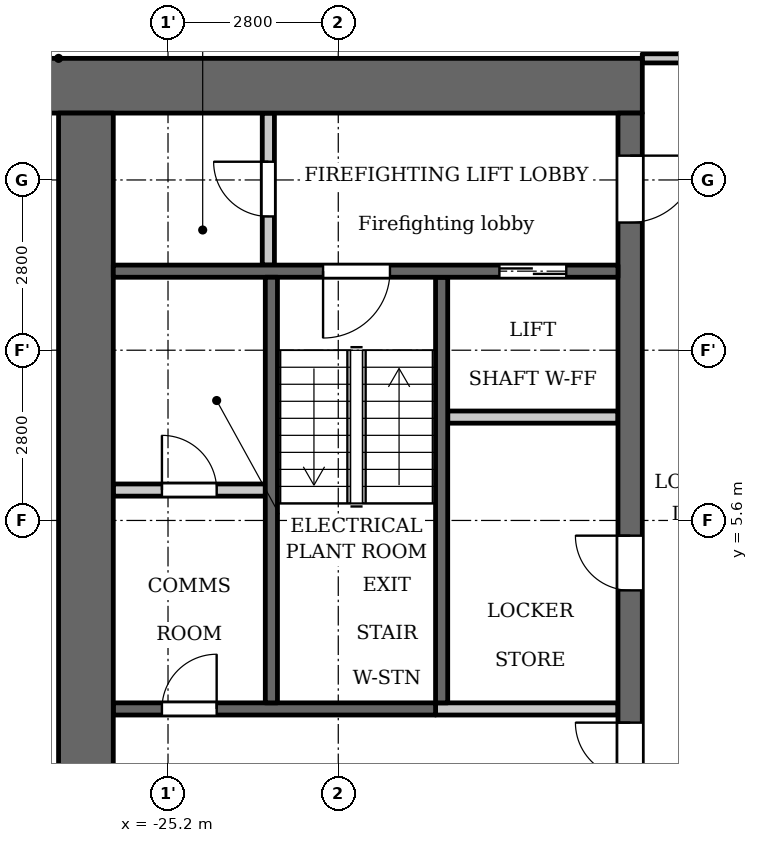
"""IFC4 building model, lengths in metres.
Left out: names, types, materials, properties, quantities, classifications, styles, units other than length and angle.
Written with IfcOpenShell. Run it as: python <this file> out.ifc"""

import sys

from ifc_helpers import new_model, si_unit, direction, frame, frame_2d, origin, place, context, subcontext, project, spatial, rectangle, extrude, element, fill, save


model = new_model("IFC4")
c1 = context("Model", 3, precision=1e-05, world=origin(), true_north=direction((0.0, 1.0)))
c2 = subcontext(c1, "Body", "Model", "MODEL_VIEW")
j1 = project(units=[si_unit("LENGTHUNIT", "METRE"), si_unit("PLANEANGLEUNIT", "RADIAN")], contexts=[c1])
p1 = place(None, origin())
s1 = spatial("IfcSite", under=j1, at=p1, CompositionType="ELEMENT")
p2 = place(p1, origin())
s2 = spatial("IfcBuilding", under=s1, at=p2, CompositionType="ELEMENT")
p3 = place(p2, frame((0.0, 0.0, 100.8)))
s3 = spatial("IfcBuildingStorey", under=s2, at=p3, CompositionType="ELEMENT", Elevation=100.8)
p4 = place(p3, frame((-20.7, 2.6, 0.0), z_axis=(0.0, 0.0, 1.0), x_axis=(0.0, 1.0, 0.0)))
e1 = element("IfcWall", 1, at=p4, inside=s3, PredefinedType="SHEAR", context=c2, shape_type="SweptSolid", body=[
    extrude(rectangle(XDim=7.0, YDim=0.2, at=frame_2d((3.5, 0.0))), origin(), (0.0, 0.0, 1.0), 3.2),
])
p5 = place(p3, frame((-20.8, 2.5, 0.0), z_axis=(0.0, 0.0, 1.0), x_axis=(-1.0, 0.0, 0.0)))
e2 = element("IfcWall", 2, at=p5, inside=s3, PredefinedType="SHEAR", context=c2, shape_type="SweptSolid", body=[
    extrude(rectangle(XDim=5.3, YDim=0.2, at=frame_2d((2.65, 0.0))), origin(), (0.0, 0.0, 1.0), 3.2),
])
p6 = place(p5, frame((3.6, 0.0, 0.0)))
e3 = element("IfcOpeningElement", 3, at=p6, cuts=e2, PredefinedType="OPENING", context=c2, shape_type="SweptSolid", body=[
    extrude(rectangle(XDim=0.9, YDim=2.1, at=frame_2d((0.45, 1.05))), frame((0.0, 0.11, 0.0), z_axis=(0.0, -1.0, 0.0), x_axis=(1.0, 0.0, 0.0)), (0.0, 0.0, 1.0), 0.22),
])
p7 = place(p3, frame((-17.4, 12.75, 0.0), z_axis=(0.0, 0.0, 1.0), x_axis=(-1.0, 0.0, 0.0)))
e4 = element("IfcWall", 4, at=p7, inside=s3, PredefinedType="SHEAR", context=c2, shape_type="SweptSolid", body=[
    extrude(rectangle(XDim=10.4, YDim=0.9, at=frame_2d((5.2, 0.0))), origin(), (0.0, 0.0, 1.0), 3.2),
])
p8 = place(p3, frame((-17.6, -12.3, 0.0), z_axis=(0.0, 0.0, 1.0), x_axis=(0.0, 1.0, 0.0)))
e5 = element("IfcWall", 5, at=p8, inside=s3, PredefinedType="SHEAR", context=c2, shape_type="SweptSolid", body=[
    extrude(rectangle(XDim=24.6, YDim=0.4, at=frame_2d((12.3, 0.0))), origin(), (0.0, 0.0, 1.0), 3.2),
])
p9 = place(p8, frame((6.0, 0.0, 0.0)))
e6 = element("IfcOpeningElement", 6, at=p9, cuts=e5, PredefinedType="OPENING", context=c2, shape_type="SweptSolid", body=[
    extrude(rectangle(XDim=1.1, YDim=2.1, at=frame_2d((0.55, 1.05))), frame((0.0, 0.21, 0.0), z_axis=(0.0, -1.0, 0.0), x_axis=(1.0, 0.0, 0.0)), (0.0, 0.0, 1.0), 0.42),
])
p10 = place(p8, frame((8.4, 0.0, 0.0)))
e7 = element("IfcOpeningElement", 7, at=p10, cuts=e5, PredefinedType="OPENING", context=c2, shape_type="SweptSolid", body=[
    extrude(rectangle(XDim=1.1, YDim=2.1, at=frame_2d((0.55, 1.05))), frame((0.0, 0.21, 0.0), z_axis=(0.0, -1.0, 0.0), x_axis=(1.0, 0.0, 0.0)), (0.0, 0.0, 1.0), 0.42),
])
p11 = place(p8, frame((10.8, 0.0, 0.0)))
e8 = element("IfcOpeningElement", 8, at=p11, cuts=e5, PredefinedType="OPENING", context=c2, shape_type="SweptSolid", body=[
    extrude(rectangle(XDim=1.1, YDim=2.1, at=frame_2d((0.55, 1.05))), frame((0.0, 0.21, 0.0), z_axis=(0.0, -1.0, 0.0), x_axis=(1.0, 0.0, 0.0)), (0.0, 0.0, 1.0), 0.42),
])
p12 = place(p8, frame((16.75, 0.0, 0.0)))
e9 = element("IfcOpeningElement", 9, at=p12, cuts=e5, PredefinedType="OPENING", context=c2, shape_type="SweptSolid", body=[
    extrude(rectangle(XDim=0.9, YDim=2.1, at=frame_2d((0.45, 1.05))), frame((0.0, 0.21, 0.0), z_axis=(0.0, -1.0, 0.0), x_axis=(1.0, 0.0, 0.0)), (0.0, 0.0, 1.0), 0.42),
])
p13 = place(p8, frame((22.8, 0.0, 0.0)))
e10 = element("IfcOpeningElement", 10, at=p13, cuts=e5, PredefinedType="OPENING", context=c2, shape_type="SweptSolid", body=[
    extrude(rectangle(XDim=1.1, YDim=2.1, at=frame_2d((0.55, 1.05))), frame((0.0, 0.21, 0.0), z_axis=(0.0, -1.0, 0.0), x_axis=(1.0, 0.0, 0.0)), (0.0, 0.0, 1.0), 0.42),
])
p14 = place(p8, frame((0.7, 0.0, 0.0)))
e11 = element("IfcOpeningElement", 11, at=p14, cuts=e5, PredefinedType="OPENING", context=c2, shape_type="SweptSolid", body=[
    extrude(rectangle(XDim=1.1, YDim=2.1, at=frame_2d((0.55, 1.05))), frame((0.0, 0.21, 0.0), z_axis=(0.0, -1.0, 0.0), x_axis=(1.0, 0.0, 0.0)), (0.0, 0.0, 1.0), 0.42),
])
p15 = place(p8, frame((12.775, 0.0, 0.0)))
e12 = element("IfcOpeningElement", 12, at=p15, cuts=e5, PredefinedType="OPENING", context=c2, shape_type="SweptSolid", body=[
    extrude(rectangle(XDim=1.8, YDim=2.1, at=frame_2d((0.9, 1.05))), frame((0.0, 0.21, 0.0), z_axis=(0.0, -1.0, 0.0), x_axis=(1.0, 0.0, 0.0)), (0.0, 0.0, 1.0), 0.42),
])
p16 = place(p3, frame((-26.55, -12.3, 0.0), z_axis=(0.0, 0.0, 1.0), x_axis=(0.0, 1.0, 0.0)))
e13 = element("IfcWall", 13, at=p16, inside=s3, PredefinedType="SHEAR", context=c2, shape_type="SweptSolid", body=[
    extrude(rectangle(XDim=24.6, YDim=0.9, at=frame_2d((12.3, 0.0))), origin(), (0.0, 0.0, 1.0), 3.2),
])
p17 = place(p3, frame((-23.55, 9.8, 0.0), z_axis=(0.0, 0.0, 1.0), x_axis=(0.0, 1.0, 0.0)))
e14 = element("IfcWall", 14, at=p17, inside=s3, PredefinedType="PARTITIONING", context=c2, shape_type="SweptSolid", body=[
    extrude(rectangle(XDim=2.5, YDim=0.2, at=frame_2d((1.25, 0.0))), origin(), (0.0, 0.0, 1.0), 3.2),
])
p18 = place(p17, frame((0.8, 0.0, 0.0)))
e15 = element("IfcOpeningElement", 15, at=p18, cuts=e14, PredefinedType="OPENING", context=c2, shape_type="SweptSolid", body=[
    extrude(rectangle(XDim=0.9, YDim=2.1, at=frame_2d((0.45, 1.05))), frame((0.0, 0.11, 0.0), z_axis=(0.0, -1.0, 0.0), x_axis=(1.0, 0.0, 0.0)), (0.0, 0.0, 1.0), 0.22),
])
p19 = place(p3, frame((-23.6, 6.1, 0.0), z_axis=(0.0, 0.0, 1.0), x_axis=(-1.0, 0.0, 0.0)))
e16 = element("IfcWall", 16, at=p19, inside=s3, PredefinedType="PARTITIONING", context=c2, shape_type="SweptSolid", body=[
    extrude(rectangle(XDim=2.5, YDim=0.2, at=frame_2d((1.25, 0.0))), origin(), (0.0, 0.0, 1.0), 3.2),
])
p20 = place(p19, frame((0.8, 0.0, 0.0)))
e17 = element("IfcOpeningElement", 17, at=p20, cuts=e16, PredefinedType="OPENING", context=c2, shape_type="SweptSolid", body=[
    extrude(rectangle(XDim=0.9, YDim=2.1, at=frame_2d((0.45, 1.05))), frame((0.0, 0.11, 0.0), z_axis=(0.0, -1.0, 0.0), x_axis=(1.0, 0.0, 0.0)), (0.0, 0.0, 1.0), 0.22),
])
p21 = place(p3, frame((-17.8, 2.5, 0.0), z_axis=(0.0, 0.0, 1.0), x_axis=(-1.0, 0.0, 0.0)))
e18 = element("IfcWall", 18, at=p21, inside=s3, PredefinedType="PARTITIONING", context=c2, shape_type="SweptSolid", body=[
    extrude(rectangle(XDim=3.0, YDim=0.2, at=frame_2d((1.5, 0.0))), origin(), (0.0, 0.0, 1.0), 3.2),
])
p22 = place(p3, frame((-17.8, 7.3, 0.0), z_axis=(0.0, 0.0, 1.0), x_axis=(-1.0, 0.0, 0.0)))
e19 = element("IfcWall", 19, at=p22, inside=s3, PredefinedType="PARTITIONING", context=c2, shape_type="SweptSolid", body=[
    extrude(rectangle(XDim=2.8, YDim=0.2, at=frame_2d((1.4, 0.0))), origin(), (0.0, 0.0, 1.0), 3.2),
])
p23 = place(p3, frame((-17.8, 9.7, 0.0), z_axis=(0.0, 0.0, 1.0), x_axis=(-1.0, 0.0, 0.0)))
e20 = element("IfcWall", 20, at=p23, inside=s3, PredefinedType="SHEAR", context=c2, shape_type="SweptSolid", body=[
    extrude(rectangle(XDim=8.3, YDim=0.2, at=frame_2d((4.15, 0.0))), origin(), (0.0, 0.0, 1.0), 3.2),
])
p24 = place(p23, frame((0.85, 0.0, 0.0)))
e21 = element("IfcOpeningElement", 21, at=p24, cuts=e20, PredefinedType="OPENING", context=c2, shape_type="SweptSolid", body=[
    extrude(rectangle(XDim=1.1, YDim=2.1, at=frame_2d((0.55, 1.05))), frame((0.0, 0.11, 0.0), z_axis=(0.0, -1.0, 0.0), x_axis=(1.0, 0.0, 0.0)), (0.0, 0.0, 1.0), 0.22),
])
p25 = place(p23, frame((3.75, 0.0, 0.0)))
e22 = element("IfcOpeningElement", 22, at=p25, cuts=e20, PredefinedType="OPENING", context=c2, shape_type="SweptSolid", body=[
    extrude(rectangle(XDim=1.1, YDim=2.1, at=frame_2d((0.55, 1.05))), frame((0.0, 0.11, 0.0), z_axis=(0.0, -1.0, 0.0), x_axis=(1.0, 0.0, 0.0)), (0.0, 0.0, 1.0), 0.22),
])
p26 = place(p3, frame((-23.5, 2.6, 0.0), z_axis=(0.0, 0.0, 1.0), x_axis=(0.0, 1.0, 0.0)))
e23 = element("IfcWall", 23, at=p26, inside=s3, PredefinedType="SHEAR", context=c2, shape_type="SweptSolid", body=[
    extrude(rectangle(XDim=7.0, YDim=0.2, at=frame_2d((3.5, 0.0))), origin(), (0.0, 0.0, 1.0), 3.2),
])
p27 = place(p3, frame((-17.4, 13.2, 0.0), z_axis=(0.0, 0.0, 1.0), x_axis=(1.0, 0.0, 0.0)))
e24 = element("IfcWall", 24, at=p27, inside=s3, PredefinedType="PARTITIONING", context=c2, shape_type="SweptSolid", body=[
    extrude(rectangle(XDim=34.8, YDim=0.15, at=frame_2d((17.4, 0.0))), origin(), (0.0, 0.0, 1.0), 3.2),
])
p28 = place(p27, frame((0.75, 0.0, 0.0)))
e25 = element("IfcOpeningElement", 25, at=p28, cuts=e24, PredefinedType="OPENING", context=c2, shape_type="SweptSolid", body=[
    extrude(rectangle(XDim=1.0, YDim=2.1, at=frame_2d((0.5, 1.05))), frame((0.0, 0.085, 0.0), z_axis=(0.0, -1.0, 0.0), x_axis=(1.0, 0.0, 0.0)), (0.0, 0.0, 1.0), 0.17),
])
p29 = place(p27, frame((33.15, 0.0, 0.0)))
e26 = element("IfcOpeningElement", 26, at=p29, cuts=e24, PredefinedType="OPENING", context=c2, shape_type="SweptSolid", body=[
    extrude(rectangle(XDim=1.0, YDim=2.1, at=frame_2d((0.5, 1.05))), frame((0.0, 0.085, 0.0), z_axis=(0.0, -1.0, 0.0), x_axis=(1.0, 0.0, 0.0)), (0.0, 0.0, 1.0), 0.17),
])
p30 = place(p27, frame((6.85, 0.0, 0.0)))
e27 = element("IfcOpeningElement", 27, at=p30, cuts=e24, PredefinedType="OPENING", context=c2, shape_type="SweptSolid", body=[
    extrude(rectangle(XDim=1.0, YDim=2.1, at=frame_2d((0.5, 1.05))), frame((0.0, 0.085, 0.0), z_axis=(0.0, -1.0, 0.0), x_axis=(1.0, 0.0, 0.0)), (0.0, 0.0, 1.0), 0.17),
])
p31 = place(p27, frame((15.45, 0.0, 0.0)))
e28 = element("IfcOpeningElement", 28, at=p31, cuts=e24, PredefinedType="OPENING", context=c2, shape_type="SweptSolid", body=[
    extrude(rectangle(XDim=1.0, YDim=2.1, at=frame_2d((0.5, 1.05))), frame((0.0, 0.085, 0.0), z_axis=(0.0, -1.0, 0.0), x_axis=(1.0, 0.0, 0.0)), (0.0, 0.0, 1.0), 0.17),
])
p32 = place(p27, frame((21.4, 0.0, 0.0)))
e29 = element("IfcOpeningElement", 29, at=p32, cuts=e24, PredefinedType="OPENING", context=c2, shape_type="SweptSolid", body=[
    extrude(rectangle(XDim=1.0, YDim=2.1, at=frame_2d((0.5, 1.05))), frame((0.0, 0.085, 0.0), z_axis=(0.0, -1.0, 0.0), x_axis=(1.0, 0.0, 0.0)), (0.0, 0.0, 1.0), 0.17),
])
p33 = place(p27, frame((23.65, 0.0, 0.0)))
e30 = element("IfcOpeningElement", 30, at=p33, cuts=e24, PredefinedType="OPENING", context=c2, shape_type="SweptSolid", body=[
    extrude(rectangle(XDim=1.0, YDim=2.1, at=frame_2d((0.5, 1.05))), frame((0.0, 0.085, 0.0), z_axis=(0.0, -1.0, 0.0), x_axis=(1.0, 0.0, 0.0)), (0.0, 0.0, 1.0), 0.17),
])
p34 = place(p12, origin())
e31 = element("IfcDoor", 31, at=p34, inside=s3, OperationType="SINGLE_SWING_LEFT", PredefinedType="DOOR", context=c2, shape_type="SweptSolid", body=[
    extrude(rectangle(XDim=0.9, YDim=2.1, at=frame_2d((0.45, 1.05))), frame((0.0, 0.025, 0.0), z_axis=(0.0, -1.0, 0.0), x_axis=(1.0, 0.0, 0.0)), (0.0, 0.0, 1.0), 0.05),
])
fill(e9, e31)
p35 = place(p24, origin())
e32 = element("IfcDoor", 32, at=p35, inside=s3, OperationType="DOUBLE_DOOR_SLIDING", PredefinedType="DOOR", context=c2, shape_type="SweptSolid", body=[
    extrude(rectangle(XDim=1.1, YDim=2.1, at=frame_2d((0.55, 1.05))), frame((0.0, 0.025, 0.0), z_axis=(0.0, -1.0, 0.0), x_axis=(1.0, 0.0, 0.0)), (0.0, 0.0, 1.0), 0.05),
])
fill(e21, e32)
p36 = place(p13, origin())
e33 = element("IfcDoor", 33, at=p36, inside=s3, OperationType="SINGLE_SWING_RIGHT", PredefinedType="DOOR", context=c2, shape_type="SweptSolid", body=[
    extrude(rectangle(XDim=1.1, YDim=2.1, at=frame_2d((0.55, 1.05))), frame((0.0, 0.025, 0.0), z_axis=(0.0, -1.0, 0.0), x_axis=(1.0, 0.0, 0.0)), (0.0, 0.0, 1.0), 0.05),
])
fill(e10, e33)
p37 = place(p18, origin())
e34 = element("IfcDoor", 34, at=p37, inside=s3, OperationType="SINGLE_SWING_LEFT", PredefinedType="DOOR", context=c2, shape_type="SweptSolid", body=[
    extrude(rectangle(XDim=0.9, YDim=2.1, at=frame_2d((0.45, 1.05))), frame((0.0, 0.025, 0.0), z_axis=(0.0, -1.0, 0.0), x_axis=(1.0, 0.0, 0.0)), (0.0, 0.0, 1.0), 0.05),
])
fill(e15, e34)
p38 = place(p25, origin())
e35 = element("IfcDoor", 35, at=p38, inside=s3, OperationType="SINGLE_SWING_LEFT", PredefinedType="DOOR", context=c2, shape_type="SweptSolid", body=[
    extrude(rectangle(XDim=1.1, YDim=2.1, at=frame_2d((0.55, 1.05))), frame((0.0, 0.025, 0.0), z_axis=(0.0, -1.0, 0.0), x_axis=(1.0, 0.0, 0.0)), (0.0, 0.0, 1.0), 0.05),
])
fill(e22, e35)
p39 = place(p15, origin())
e36 = element("IfcDoor", 36, at=p39, inside=s3, OperationType="DOUBLE_DOOR_SINGLE_SWING", PredefinedType="DOOR", context=c2, shape_type="SweptSolid", body=[
    extrude(rectangle(XDim=1.8, YDim=2.1, at=frame_2d((0.9, 1.05))), frame((0.0, 0.025, 0.0), z_axis=(0.0, -1.0, 0.0), x_axis=(1.0, 0.0, 0.0)), (0.0, 0.0, 1.0), 0.05),
])
fill(e12, e36)
p40 = place(p20, origin())
e37 = element("IfcDoor", 37, at=p40, inside=s3, OperationType="SINGLE_SWING_RIGHT", PredefinedType="DOOR", context=c2, shape_type="SweptSolid", body=[
    extrude(rectangle(XDim=0.9, YDim=2.1, at=frame_2d((0.45, 1.05))), frame((0.0, 0.025, 0.0), z_axis=(0.0, -1.0, 0.0), x_axis=(1.0, 0.0, 0.0)), (0.0, 0.0, 1.0), 0.05),
])
fill(e17, e37)
p41 = place(p6, origin())
e38 = element("IfcDoor", 38, at=p41, inside=s3, OperationType="SINGLE_SWING_LEFT", PredefinedType="DOOR", context=c2, shape_type="SweptSolid", body=[
    extrude(rectangle(XDim=0.9, YDim=2.1, at=frame_2d((0.45, 1.05))), frame((0.0, 0.025, 0.0), z_axis=(0.0, -1.0, 0.0), x_axis=(1.0, 0.0, 0.0)), (0.0, 0.0, 1.0), 0.05),
])
fill(e3, e38)
save(model, sys.argv[1])
